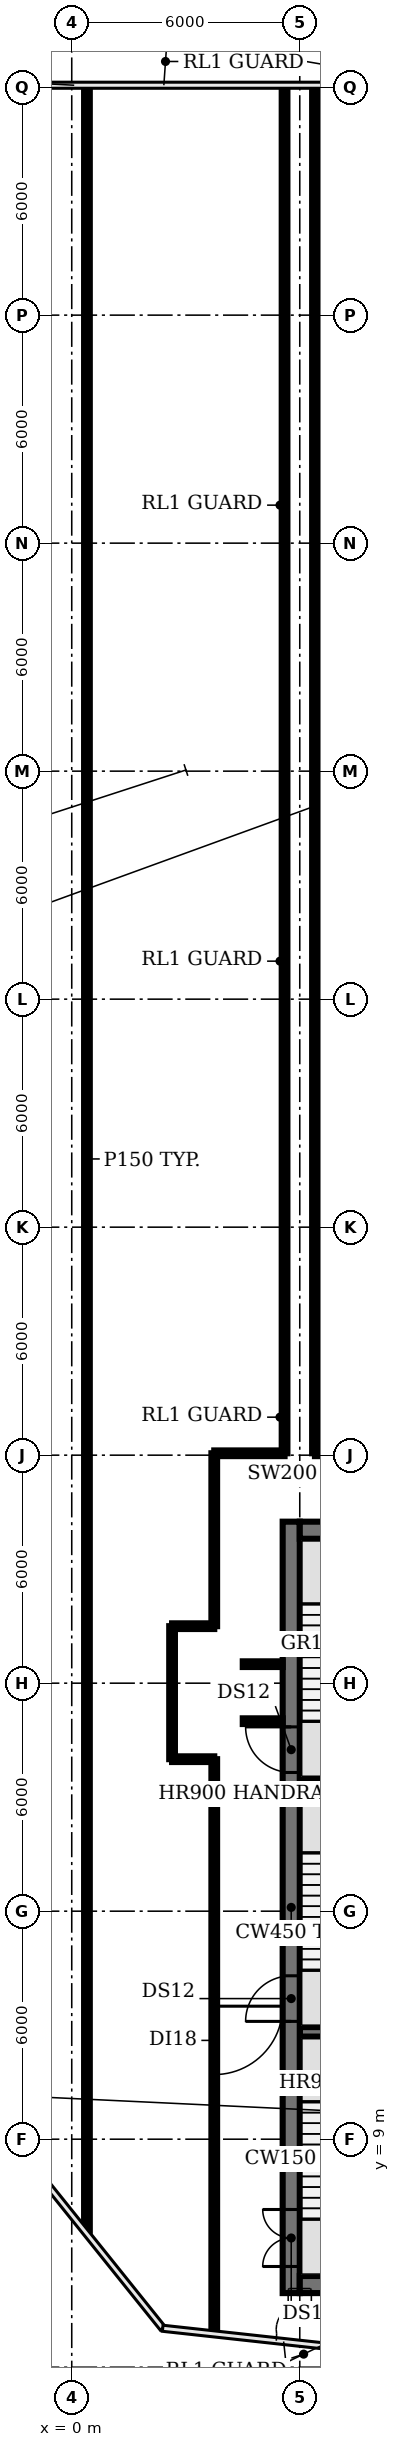
"""IFC4 building model, lengths in metres.
Left out: names, types, materials, properties, quantities, classifications, styles, units other than length and angle.
Written with IfcOpenShell. Run it as: python <this file> out.ifc"""

import sys

from ifc_helpers import new_model, si_unit, direction, frame, frame_2d, origin, place, context, subcontext, project, spatial, rectangle, extrude, element, fill, save


model = new_model("IFC4")
c1 = context("Model", 3, precision=1e-05, world=origin(), true_north=direction((0.0, 1.0)))
c2 = subcontext(c1, "Body", "Model", "MODEL_VIEW")
j1 = project(units=[si_unit("LENGTHUNIT", "METRE"), si_unit("PLANEANGLEUNIT", "RADIAN")], contexts=[c1])
p1 = place(None, origin())
s1 = spatial("IfcSite", under=j1, at=p1, CompositionType="ELEMENT")
p2 = place(p1, origin())
s2 = spatial("IfcBuilding", under=s1, at=p2, CompositionType="ELEMENT")
p3 = place(p2, frame((0.0, 0.0, 255.8)))
s3 = spatial("IfcBuildingStorey", under=s2, at=p3, CompositionType="ELEMENT", Elevation=255.8)
for number, where, z_axis, x_axis in (
    (1, (6.0, 11.825, 0.0), (0.0, 0.0, 1.0), (1.0, 0.0, 0.0)),
    (2, (6.0, 18.375, 0.0), (0.0, 0.0, 1.0), (1.0, 0.0, 0.0)),
):
    element("IfcWall", number, at=place(p3, frame(where, z_axis=z_axis, x_axis=x_axis)), inside=s3, PredefinedType="SHEAR", context=c2, shape_type="SweptSolid", body=[
        extrude(rectangle(XDim=3.15, YDim=0.25, at=frame_2d((1.575, 0.0))), origin(), (0.0, 0.0, 1.0), 8.05),
    ])
p4 = place(p3, frame((5.775, 4.95, 0.0), z_axis=(0.0, 0.0, 1.0), x_axis=(0.0, 1.0, 0.0)))
e3 = element("IfcWall", 3, at=p4, inside=s3, PredefinedType="SHEAR", context=c2, shape_type="SweptSolid", body=[
    extrude(rectangle(XDim=20.3, YDim=0.45, at=frame_2d((10.15, 0.0))), origin(), (0.0, 0.0, 1.0), 8.05),
])
p5 = place(p4, frame((0.7, 0.0, 0.0)))
e4 = element("IfcOpeningElement", 4, at=p5, cuts=e3, PredefinedType="OPENING", context=c2, shape_type="SweptSolid", body=[
    extrude(rectangle(XDim=1.5, YDim=2.1, at=frame_2d((0.75, 1.05))), frame((0.0, 0.235, 0.0), z_axis=(0.0, -1.0, 0.0), x_axis=(1.0, 0.0, 0.0)), (0.0, 0.0, 1.0), 0.47),
])
p6 = place(p4, frame((7.15, 0.0, 0.0)))
e5 = element("IfcOpeningElement", 5, at=p6, cuts=e3, PredefinedType="OPENING", context=c2, shape_type="SweptSolid", body=[
    extrude(rectangle(XDim=1.2, YDim=2.1, at=frame_2d((0.6, 1.05))), frame((0.0, 0.235, 0.0), z_axis=(0.0, -1.0, 0.0), x_axis=(1.0, 0.0, 0.0)), (0.0, 0.0, 1.0), 0.47),
])
p7 = place(p4, frame((13.7, 0.0, 0.0)))
e6 = element("IfcOpeningElement", 6, at=p7, cuts=e3, PredefinedType="OPENING", context=c2, shape_type="SweptSolid", body=[
    extrude(rectangle(XDim=1.2, YDim=2.1, at=frame_2d((0.6, 1.05))), frame((0.0, 0.235, 0.0), z_axis=(0.0, -1.0, 0.0), x_axis=(1.0, 0.0, 0.0)), (0.0, 0.0, 1.0), 0.47),
])
p8 = place(p3, frame((24.0, 5.175, 0.0), z_axis=(0.0, 0.0, 1.0), x_axis=(-1.0, 0.0, 0.0)))
e7 = element("IfcWall", 7, at=p8, inside=s3, PredefinedType="SHEAR", context=c2, shape_type="SweptSolid", body=[
    extrude(rectangle(XDim=18.0, YDim=0.45, at=frame_2d((9.0, 0.0))), origin(), (0.0, 0.0, 1.0), 8.05),
])
p9 = place(p8, frame((13.0, 0.0, 0.0)))
e8 = element("IfcOpeningElement", 8, at=p9, cuts=e7, PredefinedType="OPENING", context=c2, shape_type="SweptSolid", body=[
    extrude(rectangle(XDim=1.2, YDim=2.1, at=frame_2d((0.6, 1.05))), frame((0.0, 0.235, 0.0), z_axis=(0.0, -1.0, 0.0), x_axis=(1.0, 0.0, 0.0)), (0.0, 0.0, 1.0), 0.47),
])
p10 = place(p8, frame((4.05, 0.0, 0.0)))
e9 = element("IfcOpeningElement", 9, at=p10, cuts=e7, PredefinedType="OPENING", context=c2, shape_type="SweptSolid", body=[
    extrude(rectangle(XDim=1.0, YDim=2.1, at=frame_2d((0.5, 1.05))), frame((0.0, 0.235, 0.0), z_axis=(0.0, -1.0, 0.0), x_axis=(1.0, 0.0, 0.0)), (0.0, 0.0, 1.0), 0.47),
])
p11 = place(p3, frame((6.0, 25.025, 0.0), z_axis=(0.0, 0.0, 1.0), x_axis=(1.0, 0.0, 0.0)))
e10 = element("IfcWall", 10, at=p11, inside=s3, PredefinedType="SHEAR", context=c2, shape_type="SweptSolid", body=[
    extrude(rectangle(XDim=18.0, YDim=0.45, at=frame_2d((9.0, 0.0))), origin(), (0.0, 0.0, 1.0), 8.05),
])
p12 = place(p3, frame((0.4, 6.59, 0.0), z_axis=(0.0, 0.0, 1.0), x_axis=(0.0, 1.0, 0.0)))
e11 = element("IfcWall", 11, at=p12, inside=s3, PredefinedType="PARTITIONING", context=c2, shape_type="SweptSolid", body=[
    extrude(rectangle(XDim=56.41, YDim=0.15, at=frame_2d((28.205, 0.0))), origin(), (0.0, 0.0, 1.0), 6.33),
])
p13 = place(p3, frame((2.64, 19.0, 0.0), z_axis=(0.0, 0.0, 1.0), x_axis=(0.0, 1.0, 0.0)))
e12 = element("IfcWall", 12, at=p13, inside=s3, PredefinedType="PARTITIONING", context=c2, shape_type="SweptSolid", body=[
    extrude(rectangle(XDim=3.5, YDim=0.15, at=frame_2d((1.75, 0.0))), origin(), (0.0, 0.0, 1.0), 6.33),
])
for number, where, z_axis, x_axis in (
    (13, (2.64, 19.0, 0.0), (0.0, 0.0, 1.0), (1.0, 0.0, 0.0)),
    (14, (2.64, 22.5, 0.0), (0.0, 0.0, 1.0), (1.0, 0.0, 0.0)),
):
    element("IfcWall", number, at=place(p3, frame(where, z_axis=z_axis, x_axis=x_axis)), inside=s3, PredefinedType="PARTITIONING", context=c2, shape_type="SweptSolid", body=[
        extrude(rectangle(XDim=1.11, YDim=0.15, at=frame_2d((0.555, 0.0))), origin(), (0.0, 0.0, 1.0), 6.33),
    ])
p14 = place(p3, frame((3.75, 19.0, 0.0), z_axis=(0.0, 0.0, 1.0), x_axis=(0.0, -1.0, 0.0)))
e15 = element("IfcWall", 15, at=p14, inside=s3, PredefinedType="PARTITIONING", context=c2, shape_type="SweptSolid", body=[
    extrude(rectangle(XDim=15.07, YDim=0.15, at=frame_2d((7.535, 0.0))), origin(), (0.0, 0.0, 1.0), 6.33),
])
p15 = place(p14, frame((6.5, 0.0, 0.0)))
e16 = element("IfcOpeningElement", 16, at=p15, cuts=e15, PredefinedType="OPENING", context=c2, shape_type="SweptSolid", body=[
    extrude(rectangle(XDim=1.8, YDim=2.1, at=frame_2d((0.9, 1.05))), frame((0.0, 0.085, 0.0), z_axis=(0.0, -1.0, 0.0), x_axis=(1.0, 0.0, 0.0)), (0.0, 0.0, 1.0), 0.17),
])
p16 = place(p3, frame((3.75, 22.5, 0.0), z_axis=(0.0, 0.0, 1.0), x_axis=(0.0, 1.0, 0.0)))
e17 = element("IfcWall", 17, at=p16, inside=s3, PredefinedType="PARTITIONING", context=c2, shape_type="SweptSolid", body=[
    extrude(rectangle(XDim=4.55, YDim=0.15, at=frame_2d((2.275, 0.0))), origin(), (0.0, 0.0, 1.0), 6.33),
])
p17 = place(p3, frame((3.75, 27.05, 0.0), z_axis=(0.0, 0.0, 1.0), x_axis=(1.0, 0.0, 0.0)))
e18 = element("IfcWall", 18, at=p17, inside=s3, PredefinedType="PARTITIONING", context=c2, shape_type="SweptSolid", body=[
    extrude(rectangle(XDim=1.85, YDim=0.15, at=frame_2d((0.925, 0.0))), origin(), (0.0, 0.0, 1.0), 6.33),
])
for number, where, z_axis, x_axis in (
    (19, (4.5, 20.0, 0.0), (0.0, 0.0, 1.0), (1.0, 0.0, 0.0)),
    (20, (4.5, 21.5, 0.0), (0.0, 0.0, 1.0), (1.0, 0.0, 0.0)),
):
    element("IfcWall", number, at=place(p3, frame(where, z_axis=z_axis, x_axis=x_axis)), inside=s3, PredefinedType="PARTITIONING", context=c2, shape_type="SweptSolid", body=[
        extrude(rectangle(XDim=1.05, YDim=0.15, at=frame_2d((0.525, 0.0))), origin(), (0.0, 0.0, 1.0), 6.33),
    ])
for number, where, z_axis, x_axis in (
    (21, (5.6, 27.05, 0.0), (0.0, 0.0, 1.0), (0.0, 1.0, 0.0)),
    (22, (6.4, 27.05, 0.0), (0.0, 0.0, 1.0), (0.0, 1.0, 0.0)),
):
    element("IfcWall", number, at=place(p3, frame(where, z_axis=z_axis, x_axis=x_axis)), inside=s3, PredefinedType="PARTITIONING", context=c2, shape_type="SweptSolid", body=[
        extrude(rectangle(XDim=35.95, YDim=0.15, at=frame_2d((17.975, 0.0))), origin(), (0.0, 0.0, 1.0), 6.33),
    ])
p18 = place(p3, frame((6.4, 27.05, 0.0), z_axis=(0.0, 0.0, 1.0), x_axis=(1.0, 0.0, 0.0)))
e23 = element("IfcWall", 23, at=p18, inside=s3, PredefinedType="PARTITIONING", context=c2, shape_type="SweptSolid", body=[
    extrude(rectangle(XDim=5.2, YDim=0.15, at=frame_2d((2.6, 0.0))), origin(), (0.0, 0.0, 1.0), 6.33),
])
p19 = place(p18, frame((2.0, 0.0, 0.0)))
e24 = element("IfcOpeningElement", 24, at=p19, cuts=e23, PredefinedType="OPENING", context=c2, shape_type="SweptSolid", body=[
    extrude(rectangle(XDim=1.2, YDim=2.1, at=frame_2d((0.6, 1.05))), frame((0.0, 0.085, 0.0), z_axis=(0.0, -1.0, 0.0), x_axis=(1.0, 0.0, 0.0)), (0.0, 0.0, 1.0), 0.17),
])
p20 = place(p5, origin())
e25 = element("IfcDoor", 25, at=p20, inside=s3, OperationType="DOUBLE_DOOR_SINGLE_SWING", PredefinedType="DOOR", context=c2, shape_type="SweptSolid", body=[
    extrude(rectangle(XDim=1.5, YDim=2.1, at=frame_2d((0.75, 1.05))), frame((0.0, 0.025, 0.0), z_axis=(0.0, -1.0, 0.0), x_axis=(1.0, 0.0, 0.0)), (0.0, 0.0, 1.0), 0.05),
])
fill(e4, e25)
p21 = place(p6, origin())
e26 = element("IfcDoor", 26, at=p21, inside=s3, OperationType="SINGLE_SWING_LEFT", PredefinedType="DOOR", context=c2, shape_type="SweptSolid", body=[
    extrude(rectangle(XDim=1.2, YDim=2.1, at=frame_2d((0.6, 1.05))), frame((0.0, 0.025, 0.0), z_axis=(0.0, -1.0, 0.0), x_axis=(1.0, 0.0, 0.0)), (0.0, 0.0, 1.0), 0.05),
])
fill(e5, e26)
p22 = place(p7, origin())
e27 = element("IfcDoor", 27, at=p22, inside=s3, OperationType="SINGLE_SWING_RIGHT", PredefinedType="DOOR", context=c2, shape_type="SweptSolid", body=[
    extrude(rectangle(XDim=1.2, YDim=2.1, at=frame_2d((0.6, 1.05))), frame((0.0, 0.025, 0.0), z_axis=(0.0, -1.0, 0.0), x_axis=(1.0, 0.0, 0.0)), (0.0, 0.0, 1.0), 0.05),
])
fill(e6, e27)
p23 = place(p15, origin())
e28 = element("IfcDoor", 28, at=p23, inside=s3, OperationType="SINGLE_SWING_LEFT", PredefinedType="DOOR", context=c2, shape_type="SweptSolid", body=[
    extrude(rectangle(XDim=1.8, YDim=2.1, at=frame_2d((0.9, 1.05))), frame((0.0, 0.025, 0.0), z_axis=(0.0, -1.0, 0.0), x_axis=(1.0, 0.0, 0.0)), (0.0, 0.0, 1.0), 0.05),
])
fill(e16, e28)
save(model, sys.argv[1])
